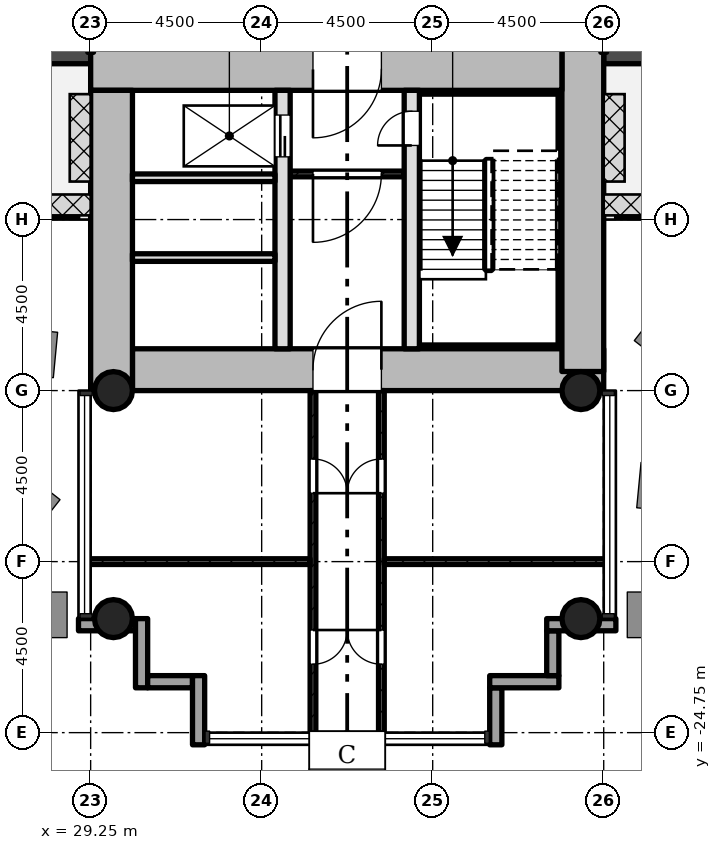
"""IFC4 building model, lengths in metres.
Left out: names, types, materials, properties, quantities, classifications, styles, units other than length and angle.
Written with IfcOpenShell. Run it as: python <this file> out.ifc"""

import sys

from ifc_helpers import new_model, si_unit, direction, frame, frame_2d, origin, origin_2d, place, context, subcontext, project, spatial, rectangle, hollow_circle, extrude, element, fill, save


model = new_model("IFC4")
c1 = context("Model", 3, precision=1e-05, world=origin(), true_north=direction((0.0, 1.0)))
c2 = subcontext(c1, "Body", "Model", "MODEL_VIEW")
j1 = project(units=[si_unit("LENGTHUNIT", "METRE"), si_unit("PLANEANGLEUNIT", "RADIAN")], contexts=[c1])
p1 = place(None, origin())
s1 = spatial("IfcSite", under=j1, at=p1, CompositionType="ELEMENT")
p2 = place(p1, origin())
s2 = spatial("IfcBuilding", under=s1, at=p2, CompositionType="ELEMENT")
p3 = place(p2, frame((0.0, 0.0, 72.1)))
s3 = spatial("IfcBuildingStorey", under=s2, at=p3, CompositionType="ELEMENT", Elevation=72.1)
p4 = place(p3, frame((30.35, -15.2, 0.0), z_axis=(0.0, 0.0, 1.0), x_axis=(1.0, 0.0, 0.0)))
e1 = element("IfcWall", 1, at=p4, inside=s3, PredefinedType="SHEAR", context=c2, shape_type="SweptSolid", body=[
    extrude(rectangle(XDim=12.4, YDim=1.1, at=frame_2d((6.2, 0.0))), origin(), (0.0, 0.0, 1.0), 4.5),
])
p5 = place(p4, frame((4.75, 0.0, 0.0)))
e2 = element("IfcOpeningElement", 2, at=p5, cuts=e1, PredefinedType="OPENING", context=c2, shape_type="SweptSolid", body=[
    extrude(rectangle(XDim=1.8, YDim=2.1, at=frame_2d((0.9, 1.05))), frame((0.0, 0.56, 0.0), z_axis=(0.0, -1.0, 0.0), x_axis=(1.0, 0.0, 0.0)), (0.0, 0.0, 1.0), 1.12),
])
p6 = place(p3, frame((42.2, -15.248, 0.0), z_axis=(0.0, 0.0, 1.0), x_axis=(0.0, 1.0, 0.0)))
e3 = element("IfcWall", 3, at=p6, inside=s3, PredefinedType="SHEAR", context=c2, shape_type="SweptSolid", body=[
    extrude(rectangle(XDim=8.596, YDim=1.1, at=frame_2d((4.298, 0.0))), origin(), (0.0, 0.0, 1.0), 4.5),
])
p7 = place(p3, frame((41.65, -7.3, 0.0), z_axis=(0.0, 0.0, 1.0), x_axis=(-1.0, 0.0, 0.0)))
e4 = element("IfcWall", 4, at=p7, inside=s3, PredefinedType="SHEAR", context=c2, shape_type="SweptSolid", body=[
    extrude(rectangle(XDim=12.4, YDim=1.1, at=frame_2d((6.2, 0.0))), origin(), (0.0, 0.0, 1.0), 4.5),
])
p8 = place(p7, frame((4.75, 0.0, 0.0)))
e5 = element("IfcOpeningElement", 5, at=p8, cuts=e4, PredefinedType="OPENING", context=c2, shape_type="SweptSolid", body=[
    extrude(rectangle(XDim=1.8, YDim=2.1, at=frame_2d((0.9, 1.05))), frame((0.0, 0.56, 0.0), z_axis=(0.0, -1.0, 0.0), x_axis=(1.0, 0.0, 0.0)), (0.0, 0.0, 1.0), 1.12),
])
p9 = place(p3, frame((29.8, -7.85, 0.0), z_axis=(0.0, 0.0, 1.0), x_axis=(0.0, -1.0, 0.0)))
e6 = element("IfcWall", 6, at=p9, inside=s3, PredefinedType="SHEAR", context=c2, shape_type="SweptSolid", body=[
    extrude(rectangle(XDim=7.9, YDim=1.1, at=frame_2d((3.95, 0.0))), origin(), (0.0, 0.0, 1.0), 4.5),
])
p10 = place(p3, frame((34.3, -14.65, 0.0), z_axis=(0.0, 0.0, 1.0), x_axis=(0.0, 1.0, 0.0)))
e7 = element("IfcWall", 7, at=p10, inside=s3, PredefinedType="SHEAR", context=c2, shape_type="SweptSolid", body=[
    extrude(rectangle(XDim=6.8, YDim=0.4, at=frame_2d((3.4, 0.0))), origin(), (0.0, 0.0, 1.0), 4.5),
])
p11 = place(p10, frame((5.05, 0.0, 0.0)))
e8 = element("IfcOpeningElement", 8, at=p11, cuts=e7, PredefinedType="OPENING", context=c2, shape_type="SweptSolid", body=[
    extrude(rectangle(XDim=1.1, YDim=2.1, at=frame_2d((0.55, 1.05))), frame((0.0, 0.21, 0.0), z_axis=(0.0, -1.0, 0.0), x_axis=(1.0, 0.0, 0.0)), (0.0, 0.0, 1.0), 0.42),
])
p12 = place(p3, frame((37.7, -14.65, 0.0), z_axis=(0.0, 0.0, 1.0), x_axis=(0.0, 1.0, 0.0)))
e9 = element("IfcWall", 9, at=p12, inside=s3, PredefinedType="SHEAR", context=c2, shape_type="SweptSolid", body=[
    extrude(rectangle(XDim=6.8, YDim=0.4, at=frame_2d((3.4, 0.0))), origin(), (0.0, 0.0, 1.0), 4.5),
])
p13 = place(p12, frame((5.35, 0.0, 0.0)))
e10 = element("IfcOpeningElement", 10, at=p13, cuts=e9, PredefinedType="OPENING", context=c2, shape_type="SweptSolid", body=[
    extrude(rectangle(XDim=0.9, YDim=2.1, at=frame_2d((0.45, 1.05))), frame((0.0, 0.21, 0.0), z_axis=(0.0, -1.0, 0.0), x_axis=(1.0, 0.0, 0.0)), (0.0, 0.0, 1.0), 0.42),
])
for number, where, z_axis, x_axis in (
    (11, (42.15, -15.75, 0.0), (0.0, 0.0, 1.0), (1.0, 0.0, 0.0)),
    (12, (29.85, -15.75, 0.0), (0.0, 0.0, 1.0), (1.0, 0.0, 0.0)),
    (13, (42.15, -21.75, 0.0), (0.0, 0.0, 1.0), (1.0, 0.0, 0.0)),
    (14, (29.85, -21.75, 0.0), (0.0, 0.0, 1.0), (1.0, 0.0, 0.0)),
):
    element("IfcColumn", number, at=place(p3, frame(where, z_axis=z_axis, x_axis=x_axis)), inside=s3, PredefinedType="COLUMN", context=c2, shape_type="SweptSolid", body=[
        extrude(hollow_circle(Radius=0.5, WallThickness=0.036, at=origin_2d()), origin(), (0.0, 0.0, 1.0), 4.5),
    ])
p14 = place(p3, frame((39.91, -25.07, -0.3), z_axis=(0.0, 0.0, 1.0), x_axis=(0.0, 1.0, 0.0)))
e15 = element("IfcWall", 15, at=p14, inside=s3, PredefinedType="STANDARD", context=c2, shape_type="SweptSolid", body=[
    extrude(rectangle(XDim=1.5, YDim=0.32, at=frame_2d((0.75, 0.0))), origin(), (0.0, 0.0, 1.0), 4.5),
])
p15 = place(p3, frame((39.75, -23.41, -0.3), z_axis=(0.0, 0.0, 1.0), x_axis=(1.0, 0.0, 0.0)))
e16 = element("IfcWall", 16, at=p15, inside=s3, PredefinedType="STANDARD", context=c2, shape_type="SweptSolid", body=[
    extrude(rectangle(XDim=1.82, YDim=0.32, at=frame_2d((0.91, 0.0))), origin(), (0.0, 0.0, 1.0), 4.5),
])
p16 = place(p3, frame((41.41, -23.25, -0.3), z_axis=(0.0, 0.0, 1.0), x_axis=(0.0, 1.0, 0.0)))
e17 = element("IfcWall", 17, at=p16, inside=s3, PredefinedType="STANDARD", context=c2, shape_type="SweptSolid", body=[
    extrude(rectangle(XDim=1.18, YDim=0.32, at=frame_2d((0.59, 0.0))), origin(), (0.0, 0.0, 1.0), 4.5),
])
p17 = place(p3, frame((41.25, -21.91, -0.3), z_axis=(0.0, 0.0, 1.0), x_axis=(1.0, 0.0, 0.0)))
e18 = element("IfcWall", 18, at=p17, inside=s3, PredefinedType="STANDARD", context=c2, shape_type="SweptSolid", body=[
    extrude(rectangle(XDim=1.82, YDim=0.32, at=frame_2d((0.91, 0.0))), origin(), (0.0, 0.0, 1.0), 4.5),
])
p18 = place(p3, frame((42.75, -6.95, -0.02), z_axis=(0.0, 0.0, 1.0), x_axis=(1.0, 0.0, 0.0)))
e19 = element("IfcWall", 19, at=p18, inside=s3, PredefinedType="STANDARD", context=c2, shape_type="SweptSolid", body=[
    extrude(rectangle(XDim=4.5, YDim=0.4, at=frame_2d((2.25, 0.0))), origin(), (0.0, 0.0, 1.0), 4.22),
])
p19 = place(p18, frame((1.35, 0.0, 0.02)))
e20 = element("IfcOpeningElement", 20, at=p19, cuts=e19, PredefinedType="OPENING", context=c2, shape_type="SweptSolid", body=[
    extrude(rectangle(XDim=1.8, YDim=2.1, at=frame_2d((0.9, 1.05))), frame((0.0, 0.21, 0.0), z_axis=(0.0, -1.0, 0.0), x_axis=(1.0, 0.0, 0.0)), (0.0, 0.0, 1.0), 0.42),
])
p20 = place(p3, frame((24.75, -6.95, -0.02), z_axis=(0.0, 0.0, 1.0), x_axis=(1.0, 0.0, 0.0)))
e21 = element("IfcWall", 21, at=p20, inside=s3, PredefinedType="STANDARD", context=c2, shape_type="SweptSolid", body=[
    extrude(rectangle(XDim=4.5, YDim=0.4, at=frame_2d((2.25, 0.0))), origin(), (0.0, 0.0, 1.0), 4.22),
])
p21 = place(p20, frame((1.35, 0.0, 0.02)))
e22 = element("IfcOpeningElement", 22, at=p21, cuts=e21, PredefinedType="OPENING", context=c2, shape_type="SweptSolid", body=[
    extrude(rectangle(XDim=1.8, YDim=2.1, at=frame_2d((0.9, 1.05))), frame((0.0, 0.21, 0.0), z_axis=(0.0, -1.0, 0.0), x_axis=(1.0, 0.0, 0.0)), (0.0, 0.0, 1.0), 0.42),
])
p22 = place(p3, frame((28.93, -21.91, -0.3), z_axis=(0.0, 0.0, 1.0), x_axis=(1.0, 0.0, 0.0)))
e23 = element("IfcWall", 23, at=p22, inside=s3, PredefinedType="STANDARD", context=c2, shape_type="SweptSolid", body=[
    extrude(rectangle(XDim=1.5, YDim=0.32, at=frame_2d((0.75, 0.0))), origin(), (0.0, 0.0, 1.0), 4.5),
])
p23 = place(p3, frame((30.59, -21.75, -0.3), z_axis=(0.0, 0.0, 1.0), x_axis=(0.0, -1.0, 0.0)))
e24 = element("IfcWall", 24, at=p23, inside=s3, PredefinedType="STANDARD", context=c2, shape_type="SweptSolid", body=[
    extrude(rectangle(XDim=1.82, YDim=0.32, at=frame_2d((0.91, 0.0))), origin(), (0.0, 0.0, 1.0), 4.5),
])
p24 = place(p3, frame((30.75, -23.41, -0.3), z_axis=(0.0, 0.0, 1.0), x_axis=(1.0, 0.0, 0.0)))
e25 = element("IfcWall", 25, at=p24, inside=s3, PredefinedType="STANDARD", context=c2, shape_type="SweptSolid", body=[
    extrude(rectangle(XDim=1.18, YDim=0.32, at=frame_2d((0.59, 0.0))), origin(), (0.0, 0.0, 1.0), 4.5),
])
p25 = place(p3, frame((32.09, -23.25, -0.3), z_axis=(0.0, 0.0, 1.0), x_axis=(0.0, -1.0, 0.0)))
e26 = element("IfcWall", 26, at=p25, inside=s3, PredefinedType="STANDARD", context=c2, shape_type="SweptSolid", body=[
    extrude(rectangle(XDim=1.82, YDim=0.32, at=frame_2d((0.91, 0.0))), origin(), (0.0, 0.0, 1.0), 4.5),
])
p26 = place(p3, frame((34.5, -10.05, 0.0), z_axis=(0.0, 0.0, 1.0), x_axis=(1.0, 0.0, 0.0)))
e27 = element("IfcWall", 27, at=p26, inside=s3, PredefinedType="PARTITIONING", context=c2, shape_type="SweptSolid", body=[
    extrude(rectangle(XDim=3.0, YDim=0.15, at=frame_2d((1.5, 0.0))), origin(), (0.0, 0.0, 1.0), 4.08),
])
p27 = place(p26, frame((0.6, 0.0, 0.0)))
e28 = element("IfcOpeningElement", 28, at=p27, cuts=e27, PredefinedType="OPENING", context=c2, shape_type="SweptSolid", body=[
    extrude(rectangle(XDim=1.8, YDim=2.1, at=frame_2d((0.9, 1.05))), frame((0.0, 0.085, 0.0), z_axis=(0.0, -1.0, 0.0), x_axis=(1.0, 0.0, 0.0)), (0.0, 0.0, 1.0), 0.17),
])
for number, where, z_axis, x_axis in (
    (29, (30.35, -10.15, 0.0), (0.0, 0.0, 1.0), (1.0, 0.0, 0.0)),
    (30, (30.35, -12.25, 0.0), (0.0, 0.0, 1.0), (1.0, 0.0, 0.0)),
):
    element("IfcWall", number, at=place(p3, frame(where, z_axis=z_axis, x_axis=x_axis)), inside=s3, PredefinedType="SOLIDWALL", context=c2, shape_type="SweptSolid", body=[
        extrude(rectangle(XDim=3.75, YDim=0.2, at=frame_2d((1.875, 0.0))), origin(), (0.0, 0.0, 1.0), 4.08),
    ])
p28 = place(p3, frame((35.1, -24.85, 0.0), z_axis=(0.0, 0.0, 1.0), x_axis=(0.0, 1.0, 0.0)))
e31 = element("IfcWall", 31, at=p28, inside=s3, PredefinedType="PARTITIONING", context=c2, shape_type="SweptSolid", body=[
    extrude(rectangle(XDim=9.1, YDim=0.15, at=frame_2d((4.55, 0.0))), origin(), (0.0, 0.0, 1.0), 4.08),
])
p29 = place(p28, frame((1.9, 0.0, 0.0)))
e32 = element("IfcOpeningElement", 32, at=p29, cuts=e31, PredefinedType="OPENING", context=c2, shape_type="SweptSolid", body=[
    extrude(rectangle(XDim=0.9, YDim=2.1, at=frame_2d((0.45, 1.05))), frame((0.0, 0.085, 0.0), z_axis=(0.0, -1.0, 0.0), x_axis=(1.0, 0.0, 0.0)), (0.0, 0.0, 1.0), 0.17),
])
p30 = place(p28, frame((6.4, 0.0, 0.0)))
e33 = element("IfcOpeningElement", 33, at=p30, cuts=e31, PredefinedType="OPENING", context=c2, shape_type="SweptSolid", body=[
    extrude(rectangle(XDim=0.9, YDim=2.1, at=frame_2d((0.45, 1.05))), frame((0.0, 0.085, 0.0), z_axis=(0.0, -1.0, 0.0), x_axis=(1.0, 0.0, 0.0)), (0.0, 0.0, 1.0), 0.17),
])
p31 = place(p3, frame((35.025, -20.25, 0.0), z_axis=(0.0, 0.0, 1.0), x_axis=(-1.0, 0.0, 0.0)))
e34 = element("IfcWall", 34, at=p31, inside=s3, PredefinedType="PARTITIONING", context=c2, shape_type="SweptSolid", body=[
    extrude(rectangle(XDim=5.875, YDim=0.15, at=frame_2d((2.938, 0.0))), origin(), (0.0, 0.0, 1.0), 4.08),
])
p32 = place(p3, frame((36.9, -24.85, 0.0), z_axis=(0.0, 0.0, 1.0), x_axis=(0.0, 1.0, 0.0)))
e35 = element("IfcWall", 35, at=p32, inside=s3, PredefinedType="PARTITIONING", context=c2, shape_type="SweptSolid", body=[
    extrude(rectangle(XDim=9.1, YDim=0.15, at=frame_2d((4.55, 0.0))), origin(), (0.0, 0.0, 1.0), 4.08),
])
p33 = place(p32, frame((1.9, 0.0, 0.0)))
e36 = element("IfcOpeningElement", 36, at=p33, cuts=e35, PredefinedType="OPENING", context=c2, shape_type="SweptSolid", body=[
    extrude(rectangle(XDim=0.9, YDim=2.1, at=frame_2d((0.45, 1.05))), frame((0.0, 0.085, 0.0), z_axis=(0.0, -1.0, 0.0), x_axis=(1.0, 0.0, 0.0)), (0.0, 0.0, 1.0), 0.17),
])
p34 = place(p32, frame((6.4, 0.0, 0.0)))
e37 = element("IfcOpeningElement", 37, at=p34, cuts=e35, PredefinedType="OPENING", context=c2, shape_type="SweptSolid", body=[
    extrude(rectangle(XDim=0.9, YDim=2.1, at=frame_2d((0.45, 1.05))), frame((0.0, 0.085, 0.0), z_axis=(0.0, -1.0, 0.0), x_axis=(1.0, 0.0, 0.0)), (0.0, 0.0, 1.0), 0.17),
])
p35 = place(p3, frame((36.975, -20.25, 0.0), z_axis=(0.0, 0.0, 1.0), x_axis=(1.0, 0.0, 0.0)))
e38 = element("IfcWall", 38, at=p35, inside=s3, PredefinedType="PARTITIONING", context=c2, shape_type="SweptSolid", body=[
    extrude(rectangle(XDim=5.875, YDim=0.15, at=frame_2d((2.938, 0.0))), origin(), (0.0, 0.0, 1.0), 4.08),
])
p36 = place(p3, frame((37.9, -14.6, 0.0), z_axis=(0.0, 0.0, 1.0), x_axis=(1.0, 0.0, 0.0)))
e39 = element("IfcWall", 39, at=p36, inside=s3, PredefinedType="SHEAR", context=c2, shape_type="SweptSolid", body=[
    extrude(rectangle(XDim=3.75, YDim=0.1, at=frame_2d((1.875, 0.0))), origin(), (0.0, 0.0, 1.0), 4.5),
])
p37 = place(p3, frame((41.6, -7.95, 0.0), z_axis=(0.0, 0.0, 1.0), x_axis=(0.0, -1.0, 0.0)))
e40 = element("IfcWall", 40, at=p37, inside=s3, PredefinedType="SHEAR", context=c2, shape_type="SweptSolid", body=[
    extrude(rectangle(XDim=6.6, YDim=0.1, at=frame_2d((3.3, 0.0))), origin(), (0.0, 0.0, 1.0), 4.5),
])
p38 = place(p3, frame((37.9, -7.9, 0.0), z_axis=(0.0, 0.0, 1.0), x_axis=(1.0, 0.0, 0.0)))
e41 = element("IfcWall", 41, at=p38, inside=s3, PredefinedType="SHEAR", context=c2, shape_type="SweptSolid", body=[
    extrude(rectangle(XDim=3.75, YDim=0.1, at=frame_2d((1.875, 0.0))), origin(), (0.0, 0.0, 1.0), 4.5),
])
p39 = place(p27, origin())
e42 = element("IfcDoor", 42, at=p39, inside=s3, OperationType="SINGLE_SWING_LEFT", PredefinedType="DOOR", context=c2, shape_type="SweptSolid", body=[
    extrude(rectangle(XDim=1.8, YDim=2.1, at=frame_2d((0.9, 1.05))), frame((0.0, 0.025, 0.0), z_axis=(0.0, -1.0, 0.0), x_axis=(1.0, 0.0, 0.0)), (0.0, 0.0, 1.0), 0.05),
])
fill(e28, e42)
p40 = place(p29, origin())
e43 = element("IfcDoor", 43, at=p40, inside=s3, OperationType="SINGLE_SWING_RIGHT", PredefinedType="DOOR", context=c2, shape_type="SweptSolid", body=[
    extrude(rectangle(XDim=0.9, YDim=2.1, at=frame_2d((0.45, 1.05))), frame((0.0, 0.025, 0.0), z_axis=(0.0, -1.0, 0.0), x_axis=(1.0, 0.0, 0.0)), (0.0, 0.0, 1.0), 0.05),
])
fill(e32, e43)
p41 = place(p30, origin())
e44 = element("IfcDoor", 44, at=p41, inside=s3, OperationType="SINGLE_SWING_LEFT", PredefinedType="DOOR", context=c2, shape_type="SweptSolid", body=[
    extrude(rectangle(XDim=0.9, YDim=2.1, at=frame_2d((0.45, 1.05))), frame((0.0, 0.025, 0.0), z_axis=(0.0, -1.0, 0.0), x_axis=(1.0, 0.0, 0.0)), (0.0, 0.0, 1.0), 0.05),
])
fill(e33, e44)
p42 = place(p33, origin())
e45 = element("IfcDoor", 45, at=p42, inside=s3, OperationType="SINGLE_SWING_LEFT", PredefinedType="DOOR", context=c2, shape_type="SweptSolid", body=[
    extrude(rectangle(XDim=0.9, YDim=2.1, at=frame_2d((0.45, 1.05))), frame((0.0, 0.025, 0.0), z_axis=(0.0, -1.0, 0.0), x_axis=(1.0, 0.0, 0.0)), (0.0, 0.0, 1.0), 0.05),
])
fill(e36, e45)
p43 = place(p34, origin())
e46 = element("IfcDoor", 46, at=p43, inside=s3, OperationType="SINGLE_SWING_RIGHT", PredefinedType="DOOR", context=c2, shape_type="SweptSolid", body=[
    extrude(rectangle(XDim=0.9, YDim=2.1, at=frame_2d((0.45, 1.05))), frame((0.0, 0.025, 0.0), z_axis=(0.0, -1.0, 0.0), x_axis=(1.0, 0.0, 0.0)), (0.0, 0.0, 1.0), 0.05),
])
fill(e37, e46)
p44 = place(p13, origin())
e47 = element("IfcDoor", 47, at=p44, inside=s3, OperationType="SINGLE_SWING_RIGHT", PredefinedType="DOOR", context=c2, shape_type="SweptSolid", body=[
    extrude(rectangle(XDim=0.9, YDim=2.1, at=frame_2d((0.45, 1.05))), frame((0.0, 0.025, 0.0), z_axis=(0.0, -1.0, 0.0), x_axis=(1.0, 0.0, 0.0)), (0.0, 0.0, 1.0), 0.05),
])
fill(e10, e47)
p45 = place(p11, origin())
e48 = element("IfcDoor", 48, at=p45, inside=s3, OperationType="SLIDING_TO_LEFT", PredefinedType="DOOR", context=c2, shape_type="SweptSolid", body=[
    extrude(rectangle(XDim=1.1, YDim=2.1, at=frame_2d((0.55, 1.05))), frame((0.0, 0.025, 0.0), z_axis=(0.0, -1.0, 0.0), x_axis=(1.0, 0.0, 0.0)), (0.0, 0.0, 1.0), 0.05),
])
fill(e8, e48)
p46 = place(p8, origin())
e49 = element("IfcDoor", 49, at=p46, inside=s3, OperationType="SINGLE_SWING_LEFT", PredefinedType="DOOR", context=c2, shape_type="SweptSolid", body=[
    extrude(rectangle(XDim=1.8, YDim=2.1, at=frame_2d((0.9, 1.05))), frame((0.0, 0.025, 0.0), z_axis=(0.0, -1.0, 0.0), x_axis=(1.0, 0.0, 0.0)), (0.0, 0.0, 1.0), 0.05),
])
fill(e5, e49)
p47 = place(p5, origin())
e50 = element("IfcDoor", 50, at=p47, inside=s3, OperationType="SINGLE_SWING_LEFT", PredefinedType="DOOR", context=c2, shape_type="SweptSolid", body=[
    extrude(rectangle(XDim=1.8, YDim=2.1, at=frame_2d((0.9, 1.05))), frame((0.0, 0.025, 0.0), z_axis=(0.0, -1.0, 0.0), x_axis=(1.0, 0.0, 0.0)), (0.0, 0.0, 1.0), 0.05),
])
fill(e2, e50)
save(model, sys.argv[1])
